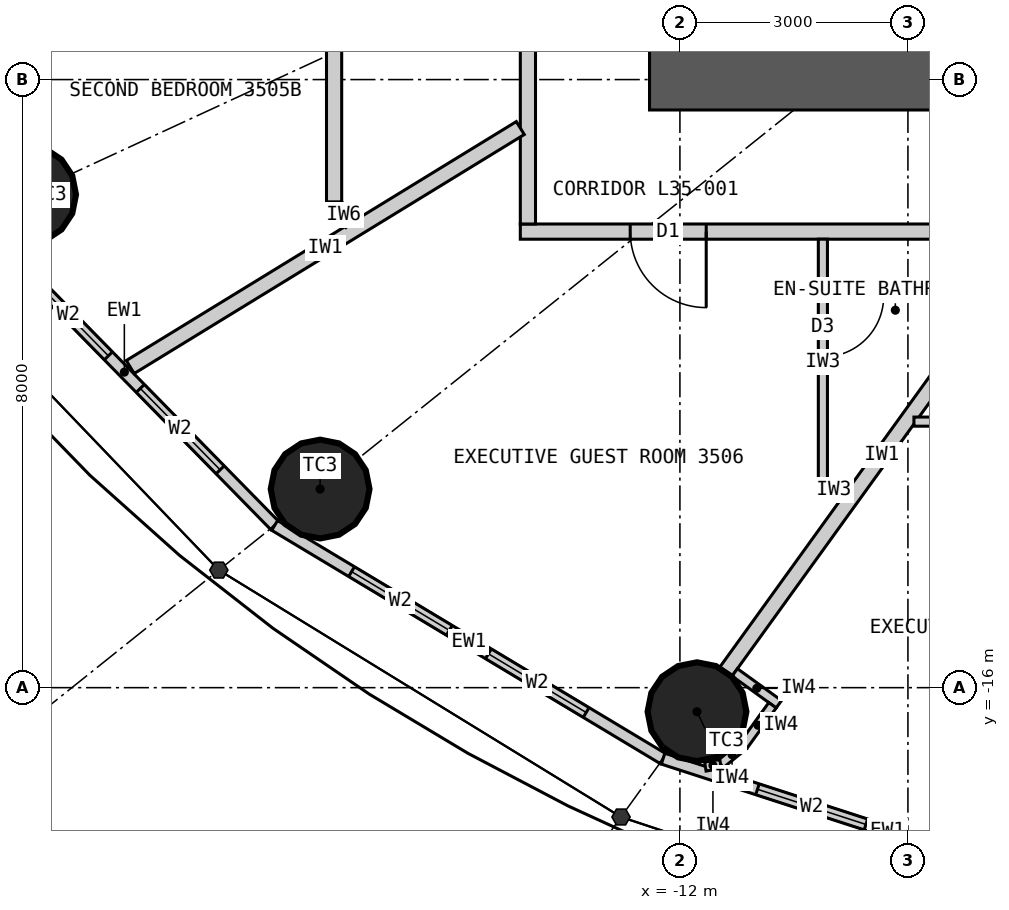
"""IFC4 building model, lengths in metres.
Left out: names, types, materials, properties, quantities, classifications, styles, units other than length and angle.
Written with IfcOpenShell. Run it as: python <this file> out.ifc"""

import sys

from ifc_helpers import new_model, si_unit, direction, frame, frame_2d, origin, origin_2d, place, context, subcontext, project, spatial, rectangle, circle, extrude, clip, halfspace, element, fill, save


model = new_model("IFC4")
c1 = context("Model", 3, precision=1e-05, world=origin(), true_north=direction((0.0, 1.0)))
c2 = subcontext(c1, "Body", "Model", "MODEL_VIEW")
j1 = project(units=[si_unit("LENGTHUNIT", "METRE"), si_unit("PLANEANGLEUNIT", "RADIAN")], contexts=[c1])
p1 = place(None, origin())
s1 = spatial("IfcSite", under=j1, at=p1, CompositionType="ELEMENT")
p2 = place(p1, origin())
s2 = spatial("IfcBuilding", under=s1, at=p2, CompositionType="ELEMENT")
p3 = place(p2, frame((0.0, 0.0, 135.3)))
s3 = spatial("IfcBuildingStorey", under=s2, at=p3, CompositionType="ELEMENT", Elevation=135.3)
for number, where, z_axis, x_axis in (
    (1, (-20.596, -9.513, 0.0), (0.0, 0.0, 1.0), (1.0, 0.0, 0.0)),
    (2, (-16.734, -13.387, 0.0), (0.0, 0.0, 1.0), (1.0, 0.0, 0.0)),
    (3, (-11.775, -16.316, 0.0), (0.0, 0.0, 1.0), (1.0, 0.0, 0.0)),
):
    element("IfcColumn", number, at=place(p3, frame(where, z_axis=z_axis, x_axis=x_axis)), inside=s3, PredefinedType="COLUMN", context=c2, shape_type="Clipping", body=[
        clip(extrude(circle(Radius=0.65, at=origin_2d()), origin(), (0.0, 0.0, 1.0), 3.3), halfspace(frame((0.0, 0.0, 2.25), z_axis=(0.0, 0.0, 1.0), x_axis=(1.0, 0.0, 0.0)), False)),
    ])
p4 = place(p3, frame((12.4, -8.0, 0.0), z_axis=(0.0, 0.0, 1.0), x_axis=(-1.0, 0.0, 0.0)))
e4 = element("IfcWall", 4, at=p4, inside=s3, PredefinedType="SHEAR", context=c2, shape_type="SweptSolid", body=[
    extrude(rectangle(XDim=24.8, YDim=0.8, at=frame_2d((12.4, 0.0))), origin(), (0.0, 0.0, 1.0), 3.3),
])
p5 = place(p4, frame((11.1, 0.0, 0.0)))
e5 = element("IfcOpeningElement", 5, at=p5, cuts=e4, PredefinedType="OPENING", context=c2, shape_type="SweptSolid", body=[
    extrude(rectangle(XDim=1.2, YDim=2.2, at=frame_2d((0.6, 1.1))), frame((0.0, 0.41, 0.0), z_axis=(0.0, -1.0, 0.0), x_axis=(1.0, 0.0, 0.0)), (0.0, 0.0, 1.0), 0.82),
])
p6 = place(p4, frame((18.7, 0.0, 0.0)))
e6 = element("IfcOpeningElement", 6, at=p6, cuts=e4, PredefinedType="OPENING", context=c2, shape_type="SweptSolid", body=[
    extrude(rectangle(XDim=0.9, YDim=2.2, at=frame_2d((0.45, 1.1))), frame((0.0, 0.41, 0.0), z_axis=(0.0, -1.0, 0.0), x_axis=(1.0, 0.0, 0.0)), (0.0, 0.0, 1.0), 0.82),
])
p7 = place(p3, frame((-21.287, -9.832, 0.0), z_axis=(0.0, 0.0, 1.0), x_axis=(0.700136650834, -0.714008872605, 0.0)))
e7 = element("IfcWall", 7, at=p7, inside=s3, PredefinedType="ELEMENTEDWALL", context=c2, shape_type="SweptSolid", body=[
    extrude(rectangle(XDim=5.649, YDim=0.15, at=frame_2d((2.825, 0.0))), origin(), (0.0, 0.0, 1.0), 3.05),
])
p8 = place(p7, frame((1.025, 0.0, 0.9)))
e8 = element("IfcOpeningElement", 8, at=p8, cuts=e7, PredefinedType="OPENING", context=c2, shape_type="SweptSolid", body=[
    extrude(rectangle(XDim=1.5, YDim=1.9, at=frame_2d((0.75, 0.95))), frame((0.0, 0.085, 0.0), z_axis=(0.0, -1.0, 0.0), x_axis=(1.0, 0.0, 0.0)), (0.0, 0.0, 1.0), 0.17),
])
p9 = place(p7, frame((3.125, 0.0, 0.9)))
e9 = element("IfcOpeningElement", 9, at=p9, cuts=e7, PredefinedType="OPENING", context=c2, shape_type="SweptSolid", body=[
    extrude(rectangle(XDim=1.5, YDim=1.9, at=frame_2d((0.75, 0.95))), frame((0.0, 0.085, 0.0), z_axis=(0.0, -1.0, 0.0), x_axis=(1.0, 0.0, 0.0)), (0.0, 0.0, 1.0), 0.17),
])
p10 = place(p3, frame((-17.332, -13.866, 0.0), z_axis=(0.0, 0.0, 1.0), x_axis=(0.857308573723, -0.514802884044, 0.0)))
e10 = element("IfcWall", 10, at=p10, inside=s3, PredefinedType="ELEMENTEDWALL", context=c2, shape_type="SweptSolid", body=[
    extrude(rectangle(XDim=5.961, YDim=0.15, at=frame_2d((2.98, 0.0))), origin(), (0.0, 0.0, 1.0), 3.05),
])
p11 = place(p10, frame((1.181, 0.0, 0.9)))
e11 = element("IfcOpeningElement", 11, at=p11, cuts=e10, PredefinedType="OPENING", context=c2, shape_type="SweptSolid", body=[
    extrude(rectangle(XDim=1.5, YDim=1.9, at=frame_2d((0.75, 0.95))), frame((0.0, 0.085, 0.0), z_axis=(0.0, -1.0, 0.0), x_axis=(1.0, 0.0, 0.0)), (0.0, 0.0, 1.0), 0.17),
])
p12 = place(p10, frame((3.281, 0.0, 0.9)))
e12 = element("IfcOpeningElement", 12, at=p12, cuts=e10, PredefinedType="OPENING", context=c2, shape_type="SweptSolid", body=[
    extrude(rectangle(XDim=1.5, YDim=1.9, at=frame_2d((0.75, 0.95))), frame((0.0, 0.085, 0.0), z_axis=(0.0, -1.0, 0.0), x_axis=(1.0, 0.0, 0.0)), (0.0, 0.0, 1.0), 0.17),
])
p13 = place(p3, frame((-12.221, -16.935, 0.0), z_axis=(0.0, 0.0, 1.0), x_axis=(0.951272691506, -0.308350881944, 0.0)))
e13 = element("IfcWall", 13, at=p13, inside=s3, PredefinedType="ELEMENTEDWALL", context=c2, shape_type="SweptSolid", body=[
    extrude(rectangle(XDim=6.211, YDim=0.15, at=frame_2d((3.105, 0.0))), origin(), (0.0, 0.0, 1.0), 3.05),
])
p14 = place(p13, frame((1.305, 0.0, 0.9)))
e14 = element("IfcOpeningElement", 14, at=p14, cuts=e13, PredefinedType="OPENING", context=c2, shape_type="SweptSolid", body=[
    extrude(rectangle(XDim=1.5, YDim=1.9, at=frame_2d((0.75, 0.95))), frame((0.0, 0.085, 0.0), z_axis=(0.0, -1.0, 0.0), x_axis=(1.0, 0.0, 0.0)), (0.0, 0.0, 1.0), 0.17),
])
p15 = place(p13, frame((3.405, 0.0, 0.9)))
e15 = element("IfcOpeningElement", 15, at=p15, cuts=e13, PredefinedType="OPENING", context=c2, shape_type="SweptSolid", body=[
    extrude(rectangle(XDim=1.5, YDim=1.9, at=frame_2d((0.75, 0.95))), frame((0.0, 0.085, 0.0), z_axis=(0.0, -1.0, 0.0), x_axis=(1.0, 0.0, 0.0)), (0.0, 0.0, 1.0), 0.17),
])
p16 = place(p3, frame((14.1, -10.0, 0.0), z_axis=(0.0, 0.0, 1.0), x_axis=(-1.0, 0.0, 0.0)))
e16 = element("IfcWall", 16, at=p16, inside=s3, PredefinedType="PARTITIONING", context=c2, shape_type="SweptSolid", body=[
    extrude(rectangle(XDim=28.2, YDim=0.2, at=frame_2d((14.1, 0.0))), origin(), (0.0, 0.0, 1.0), 3.05),
])
p17 = place(p16, frame((25.754, 0.0, 0.0)))
e17 = element("IfcOpeningElement", 17, at=p17, cuts=e16, PredefinedType="OPENING", context=c2, shape_type="SweptSolid", body=[
    extrude(rectangle(XDim=1.0, YDim=2.2, at=frame_2d((0.5, 1.1))), frame((0.0, 0.11, 0.0), z_axis=(0.0, -1.0, 0.0), x_axis=(1.0, 0.0, 0.0)), (0.0, 0.0, 1.0), 0.22),
])
p18 = place(p16, frame((18.029, 0.0, 0.0)))
e18 = element("IfcOpeningElement", 18, at=p18, cuts=e16, PredefinedType="OPENING", context=c2, shape_type="SweptSolid", body=[
    extrude(rectangle(XDim=1.0, YDim=2.2, at=frame_2d((0.5, 1.1))), frame((0.0, 0.11, 0.0), z_axis=(0.0, -1.0, 0.0), x_axis=(1.0, 0.0, 0.0)), (0.0, 0.0, 1.0), 0.22),
])
p19 = place(p16, frame((12.884, 0.0, 0.0)))
e19 = element("IfcOpeningElement", 19, at=p19, cuts=e16, PredefinedType="OPENING", context=c2, shape_type="SweptSolid", body=[
    extrude(rectangle(XDim=1.0, YDim=2.2, at=frame_2d((0.5, 1.1))), frame((0.0, 0.11, 0.0), z_axis=(0.0, -1.0, 0.0), x_axis=(1.0, 0.0, 0.0)), (0.0, 0.0, 1.0), 0.22),
])
p20 = place(p16, frame((9.075, 0.0, 0.0)))
e20 = element("IfcOpeningElement", 20, at=p20, cuts=e16, PredefinedType="OPENING", context=c2, shape_type="SweptSolid", body=[
    extrude(rectangle(XDim=1.0, YDim=2.2, at=frame_2d((0.5, 1.1))), frame((0.0, 0.11, 0.0), z_axis=(0.0, -1.0, 0.0), x_axis=(1.0, 0.0, 0.0)), (0.0, 0.0, 1.0), 0.22),
])
p21 = place(p16, frame((3.59, 0.0, 0.0)))
e21 = element("IfcOpeningElement", 21, at=p21, cuts=e16, PredefinedType="OPENING", context=c2, shape_type="SweptSolid", body=[
    extrude(rectangle(XDim=1.0, YDim=2.2, at=frame_2d((0.5, 1.1))), frame((0.0, 0.11, 0.0), z_axis=(0.0, -1.0, 0.0), x_axis=(1.0, 0.0, 0.0)), (0.0, 0.0, 1.0), 0.22),
])
p22 = place(p3, frame((-14.0, 9.9, 0.0), z_axis=(0.0, 0.0, 1.0), x_axis=(0.0, -1.0, 0.0)))
e22 = element("IfcWall", 22, at=p22, inside=s3, PredefinedType="PARTITIONING", context=c2, shape_type="SweptSolid", body=[
    extrude(rectangle(XDim=19.8, YDim=0.2, at=frame_2d((9.9, 0.0))), origin(), (0.0, 0.0, 1.0), 3.05),
])
p23 = place(p22, frame((1.025, 0.0, 0.0)))
e23 = element("IfcOpeningElement", 23, at=p23, cuts=e22, PredefinedType="OPENING", context=c2, shape_type="SweptSolid", body=[
    extrude(rectangle(XDim=1.0, YDim=2.2, at=frame_2d((0.5, 1.1))), frame((0.0, 0.11, 0.0), z_axis=(0.0, -1.0, 0.0), x_axis=(1.0, 0.0, 0.0)), (0.0, 0.0, 1.0), 0.22),
])
p24 = place(p22, frame((10.831, 0.0, 0.0)))
e24 = element("IfcOpeningElement", 24, at=p24, cuts=e22, PredefinedType="OPENING", context=c2, shape_type="SweptSolid", body=[
    extrude(rectangle(XDim=1.0, YDim=2.2, at=frame_2d((0.5, 1.1))), frame((0.0, 0.11, 0.0), z_axis=(0.0, -1.0, 0.0), x_axis=(1.0, 0.0, 0.0)), (0.0, 0.0, 1.0), 0.22),
])
p25 = place(p3, frame((-14.1, -8.638, 0.0), z_axis=(0.0, 0.0, 1.0), x_axis=(-0.852706758009, -0.5223898782, 0.0)))
e25 = element("IfcWall", 25, at=p25, inside=s3, PredefinedType="PARTITIONING", context=c2, shape_type="SweptSolid", body=[
    extrude(rectangle(XDim=6.019, YDim=0.2, at=frame_2d((3.009, 0.0))), origin(), (0.0, 0.0, 1.0), 3.05),
])
p26 = place(p3, frame((-7.289, -10.1, 0.0), z_axis=(0.0, 0.0, 1.0), x_axis=(-0.585217367024, -0.81087645997, 0.0)))
e26 = element("IfcWall", 26, at=p26, inside=s3, PredefinedType="PARTITIONING", context=c2, shape_type="SweptSolid", body=[
    extrude(rectangle(XDim=7.016, YDim=0.2, at=frame_2d((3.508, 0.0))), origin(), (0.0, 0.0, 1.0), 2.15),
])
p27 = place(p3, frame((-16.55, 5.351, 0.0), z_axis=(0.0, 0.0, 1.0), x_axis=(0.0, -1.0, 0.0)))
e27 = element("IfcWall", 27, at=p27, inside=s3, PredefinedType="PARTITIONING", context=c2, shape_type="SweptSolid", body=[
    extrude(rectangle(XDim=14.96, YDim=0.2, at=frame_2d((7.48, 0.0))), origin(), (0.0, 0.0, 1.0), 3.05),
])
p28 = place(p27, frame((2.599, 0.0, 0.0)))
e28 = element("IfcOpeningElement", 28, at=p28, cuts=e27, PredefinedType="OPENING", context=c2, shape_type="SweptSolid", body=[
    extrude(rectangle(XDim=0.8, YDim=2.1, at=frame_2d((0.4, 1.05))), frame((0.0, 0.11, 0.0), z_axis=(0.0, -1.0, 0.0), x_axis=(1.0, 0.0, 0.0)), (0.0, 0.0, 1.0), 0.22),
])
p29 = place(p27, frame((11.27, 0.0, 0.0)))
e29 = element("IfcOpeningElement", 29, at=p29, cuts=e27, PredefinedType="OPENING", context=c2, shape_type="SweptSolid", body=[
    extrude(rectangle(XDim=0.8, YDim=2.1, at=frame_2d((0.4, 1.05))), frame((0.0, 0.11, 0.0), z_axis=(0.0, -1.0, 0.0), x_axis=(1.0, 0.0, 0.0)), (0.0, 0.0, 1.0), 0.22),
])
p30 = place(p27, frame((6.782, 0.0, 0.0)))
e30 = element("IfcOpeningElement", 30, at=p30, cuts=e27, PredefinedType="OPENING", context=c2, shape_type="SweptSolid", body=[
    extrude(rectangle(XDim=0.9, YDim=2.1, at=frame_2d((0.45, 1.05))), frame((0.0, 0.11, 0.0), z_axis=(0.0, -1.0, 0.0), x_axis=(1.0, 0.0, 0.0)), (0.0, 0.0, 1.0), 0.22),
])
p31 = place(p3, frame((-16.521, -9.679, 0.0), z_axis=(0.0, 0.0, 1.0), x_axis=(0.707106781187, -0.707106781187, 0.0)))
e31 = element("IfcWall", 31, at=p31, inside=s3, PredefinedType="PARTITIONING", context=c2, shape_type="SweptSolid", body=[
    extrude(rectangle(XDim=0.278, YDim=0.2, at=frame_2d((0.139, 0.0))), origin(), (0.0, 0.0, 1.0), 3.05),
])
p32 = place(p3, frame((-9.771, -13.4, 0.0), z_axis=(0.0, 0.0, 1.0), x_axis=(-1.0, 0.0, 0.0)))
e32 = element("IfcWall", 32, at=p32, inside=s3, PredefinedType="PARTITIONING", context=c2, shape_type="SweptSolid", body=[
    extrude(rectangle(XDim=0.408, YDim=0.12, at=frame_2d((0.204, 0.0))), origin(), (0.0, 0.0, 1.0), 3.05),
])
p33 = place(p3, frame((-10.119, -10.1, 0.0), z_axis=(0.0, 0.0, 1.0), x_axis=(0.0, -1.0, 0.0)))
e33 = element("IfcWall", 33, at=p33, inside=s3, PredefinedType="PARTITIONING", context=c2, shape_type="SweptSolid", body=[
    extrude(rectangle(XDim=3.24, YDim=0.12, at=frame_2d((1.62, 0.0))), origin(), (0.0, 0.0, 1.0), 3.05),
])
p34 = place(p33, frame((0.75, 0.0, 0.0)))
e34 = element("IfcOpeningElement", 34, at=p34, cuts=e33, PredefinedType="OPENING", context=c2, shape_type="SweptSolid", body=[
    extrude(rectangle(XDim=0.8, YDim=2.1, at=frame_2d((0.4, 1.05))), frame((0.0, 0.07, 0.0), z_axis=(0.0, -1.0, 0.0), x_axis=(1.0, 0.0, 0.0)), (0.0, 0.0, 1.0), 0.14),
])
p35 = place(p3, frame((-8.921, -12.5, 0.0), z_axis=(0.0, 0.0, 1.0), x_axis=(1.0, 0.0, 0.0)))
e35 = element("IfcWall", 35, at=p35, inside=s3, PredefinedType="PARTITIONING", context=c2, shape_type="SweptSolid", body=[
    extrude(rectangle(XDim=3.872, YDim=0.12, at=frame_2d((1.936, 0.0))), origin(), (0.0, 0.0, 1.0), 3.05),
])
p36 = place(p3, frame((-11.279, -15.799, 0.0), z_axis=(0.0, 0.0, 1.0), x_axis=(0.810912957127, -0.585166793285, 0.0)))
e36 = element("IfcWall", 36, at=p36, inside=s3, PredefinedType="PARTITIONING", context=c2, shape_type="SweptSolid", body=[
    extrude(rectangle(XDim=0.716, YDim=0.12, at=frame_2d((0.358, 0.0))), origin(), (0.0, 0.0, 1.0), 3.05),
])
p37 = place(p3, frame((-10.782, -16.231, 0.0), z_axis=(0.0, 0.0, 1.0), x_axis=(-0.585175102182, -0.810906961239, 0.0)))
e37 = element("IfcWall", 37, at=p37, inside=s3, PredefinedType="PARTITIONING", context=c2, shape_type="SweptSolid", body=[
    extrude(rectangle(XDim=0.65, YDim=0.12, at=frame_2d((0.325, 0.0))), origin(), (0.0, 0.0, 1.0), 3.05),
])
p38 = place(p3, frame((-11.162, -16.759, 0.0), z_axis=(0.0, 0.0, 1.0), x_axis=(-0.775178428527, -0.63174235567, 0.0)))
e38 = element("IfcWall", 38, at=p38, inside=s3, PredefinedType="PARTITIONING", context=c2, shape_type="SweptSolid", body=[
    extrude(rectangle(XDim=0.392, YDim=0.12, at=frame_2d((0.196, 0.0))), origin(), (0.0, 0.0, 1.0), 3.05),
])
p39 = place(p3, frame((-11.466, -17.006, 0.0), z_axis=(0.0, 0.0, 1.0), x_axis=(-0.987228877621, -0.15930832744, 0.0)))
e39 = element("IfcWall", 39, at=p39, inside=s3, PredefinedType="PARTITIONING", context=c2, shape_type="SweptSolid", body=[
    extrude(rectangle(XDim=0.202, YDim=0.12, at=frame_2d((0.101, 0.0))), origin(), (0.0, 0.0, 1.0), 3.05),
])
p40 = place(p8, origin())
e40 = element("IfcWindow", 40, at=p40, inside=s3, PartitioningType="SINGLE_PANEL", PredefinedType="WINDOW", context=c2, shape_type="SweptSolid", body=[
    extrude(rectangle(XDim=1.5, YDim=1.9, at=frame_2d((0.75, 0.95))), frame((0.0, 0.03, 0.0), z_axis=(0.0, -1.0, 0.0), x_axis=(1.0, 0.0, 0.0)), (0.0, 0.0, 1.0), 0.06),
])
fill(e8, e40)
p41 = place(p9, origin())
e41 = element("IfcWindow", 41, at=p41, inside=s3, PartitioningType="SINGLE_PANEL", PredefinedType="WINDOW", context=c2, shape_type="SweptSolid", body=[
    extrude(rectangle(XDim=1.5, YDim=1.9, at=frame_2d((0.75, 0.95))), frame((0.0, 0.03, 0.0), z_axis=(0.0, -1.0, 0.0), x_axis=(1.0, 0.0, 0.0)), (0.0, 0.0, 1.0), 0.06),
])
fill(e9, e41)
p42 = place(p11, origin())
e42 = element("IfcWindow", 42, at=p42, inside=s3, PartitioningType="SINGLE_PANEL", PredefinedType="WINDOW", context=c2, shape_type="SweptSolid", body=[
    extrude(rectangle(XDim=1.5, YDim=1.9, at=frame_2d((0.75, 0.95))), frame((0.0, 0.03, 0.0), z_axis=(0.0, -1.0, 0.0), x_axis=(1.0, 0.0, 0.0)), (0.0, 0.0, 1.0), 0.06),
])
fill(e11, e42)
p43 = place(p12, origin())
e43 = element("IfcWindow", 43, at=p43, inside=s3, PartitioningType="SINGLE_PANEL", PredefinedType="WINDOW", context=c2, shape_type="SweptSolid", body=[
    extrude(rectangle(XDim=1.5, YDim=1.9, at=frame_2d((0.75, 0.95))), frame((0.0, 0.03, 0.0), z_axis=(0.0, -1.0, 0.0), x_axis=(1.0, 0.0, 0.0)), (0.0, 0.0, 1.0), 0.06),
])
fill(e12, e43)
p44 = place(p14, origin())
e44 = element("IfcWindow", 44, at=p44, inside=s3, PartitioningType="SINGLE_PANEL", PredefinedType="WINDOW", context=c2, shape_type="SweptSolid", body=[
    extrude(rectangle(XDim=1.5, YDim=1.9, at=frame_2d((0.75, 0.95))), frame((0.0, 0.03, 0.0), z_axis=(0.0, -1.0, 0.0), x_axis=(1.0, 0.0, 0.0)), (0.0, 0.0, 1.0), 0.06),
])
fill(e14, e44)
p45 = place(p34, origin())
e45 = element("IfcDoor", 45, at=p45, inside=s3, OperationType="SINGLE_SWING_LEFT", PredefinedType="DOOR", context=c2, shape_type="SweptSolid", body=[
    extrude(rectangle(XDim=0.8, YDim=2.1, at=frame_2d((0.4, 1.05))), frame((0.0, 0.025, 0.0), z_axis=(0.0, -1.0, 0.0), x_axis=(1.0, 0.0, 0.0)), (0.0, 0.0, 1.0), 0.05),
])
fill(e34, e45)
p46 = place(p17, origin())
e46 = element("IfcDoor", 46, at=p46, inside=s3, OperationType="SINGLE_SWING_LEFT", PredefinedType="DOOR", context=c2, shape_type="SweptSolid", body=[
    extrude(rectangle(XDim=1.0, YDim=2.2, at=frame_2d((0.5, 1.1))), frame((0.0, 0.025, 0.0), z_axis=(0.0, -1.0, 0.0), x_axis=(1.0, 0.0, 0.0)), (0.0, 0.0, 1.0), 0.05),
])
fill(e17, e46)
save(model, sys.argv[1])
